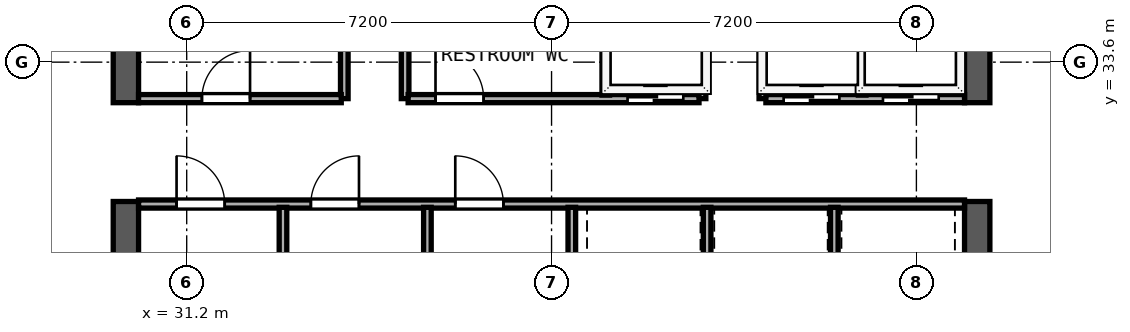
"""IFC4 building model, lengths in metres.
Left out: names, types, materials, properties, quantities, classifications, styles, units other than length and angle.
Written with IfcOpenShell. Run it as: python <this file> out.ifc"""

import sys

from ifc_helpers import new_model, si_unit, direction, frame, frame_2d, origin, place, context, subcontext, project, spatial, rectangle, extrude, element, fill, save


model = new_model("IFC4")
c1 = context("Model", 3, precision=1e-05, world=origin(), true_north=direction((0.0, 1.0)))
c2 = subcontext(c1, "Body", "Model", "MODEL_VIEW")
j1 = project(units=[si_unit("LENGTHUNIT", "METRE"), si_unit("PLANEANGLEUNIT", "RADIAN")], contexts=[c1])
p1 = place(None, origin())
s1 = spatial("IfcSite", under=j1, at=p1, CompositionType="ELEMENT")
p2 = place(p1, origin())
s2 = spatial("IfcBuilding", under=s1, at=p2, CompositionType="ELEMENT")
p3 = place(p2, frame((0.0, 0.0, 254.45)))
s3 = spatial("IfcBuildingStorey", under=s2, at=p3, CompositionType="ELEMENT", Elevation=254.45)
p4 = place(p3, frame((30.0, 26.65, 0.0), z_axis=(0.0, 0.0, 1.0), x_axis=(0.0, 1.0, 0.0)))
e1 = element("IfcWall", 1, at=p4, inside=s3, PredefinedType="SHEAR", context=c2, shape_type="SweptSolid", body=[
    extrude(rectangle(XDim=4.2, YDim=0.5, at=frame_2d((2.1, 0.0))), origin(), (0.0, 0.0, 1.0), 3.67),
])
p5 = place(p3, frame((30.0, 32.8, 0.0), z_axis=(0.0, 0.0, 1.0), x_axis=(0.0, 1.0, 0.0)))
e2 = element("IfcWall", 2, at=p5, inside=s3, PredefinedType="SHEAR", context=c2, shape_type="SweptSolid", body=[
    extrude(rectangle(XDim=10.15, YDim=0.5, at=frame_2d((5.075, 0.0))), origin(), (0.0, 0.0, 1.0), 3.67),
])
p6 = place(p3, frame((46.8, 26.65, 0.0), z_axis=(0.0, 0.0, 1.0), x_axis=(0.0, 1.0, 0.0)))
e3 = element("IfcWall", 3, at=p6, inside=s3, PredefinedType="SHEAR", context=c2, shape_type="SweptSolid", body=[
    extrude(rectangle(XDim=4.2, YDim=0.5, at=frame_2d((2.1, 0.0))), origin(), (0.0, 0.0, 1.0), 3.67),
])
p7 = place(p3, frame((46.8, 32.8, 0.0), z_axis=(0.0, 0.0, 1.0), x_axis=(0.0, 1.0, 0.0)))
e4 = element("IfcWall", 4, at=p7, inside=s3, PredefinedType="SHEAR", context=c2, shape_type="SweptSolid", body=[
    extrude(rectangle(XDim=10.15, YDim=0.5, at=frame_2d((5.075, 0.0))), origin(), (0.0, 0.0, 1.0), 3.67),
])
for number, where, z_axis, x_axis in (
    (5, (34.31, 32.88, 0.0), (0.0, 0.0, 1.0), (0.0, 1.0, 0.0)),
    (6, (35.51, 32.88, 0.0), (0.0, 0.0, 1.0), (0.0, 1.0, 0.0)),
    (7, (41.37, 32.88, 0.0), (0.0, 0.0, 1.0), (0.0, 1.0, 0.0)),
    (8, (42.57, 32.88, 0.0), (0.0, 0.0, 1.0), (0.0, 1.0, 0.0)),
):
    element("IfcWall", number, at=place(p3, frame(where, z_axis=z_axis, x_axis=x_axis)), inside=s3, PredefinedType="SOLIDWALL", context=c2, shape_type="SweptSolid", body=[
        extrude(rectangle(XDim=2.17, YDim=0.15, at=frame_2d((1.085, 0.0))), origin(), (0.0, 0.0, 1.0), 3.67),
    ])
p8 = place(p3, frame((30.25, 32.88, 0.0), z_axis=(0.0, 0.0, 1.0), x_axis=(1.0, 0.0, 0.0)))
e9 = element("IfcWall", 9, at=p8, inside=s3, PredefinedType="SOLIDWALL", context=c2, shape_type="SweptSolid", body=[
    extrude(rectangle(XDim=4.0, YDim=0.16, at=frame_2d((2.0, 0.0))), origin(), (0.0, 0.0, 1.0), 3.67),
])
p9 = place(p8, frame((2.2, 0.0, 0.0), z_axis=(0.0, 0.0, 1.0), x_axis=(-1.0, 0.0, 0.0)))
e10 = element("IfcOpeningElement", 10, at=p9, cuts=e9, PredefinedType="OPENING", context=c2, shape_type="SweptSolid", body=[
    extrude(rectangle(XDim=0.95, YDim=2.12, at=frame_2d((0.475, 1.06))), frame((0.0, 0.09, 0.0), z_axis=(0.0, -1.0, 0.0), x_axis=(1.0, 0.0, 0.0)), (0.0, 0.0, 1.0), 0.18),
])
p10 = place(p3, frame((35.57, 32.88, 0.0), z_axis=(0.0, 0.0, 1.0), x_axis=(1.0, 0.0, 0.0)))
e11 = element("IfcWall", 11, at=p10, inside=s3, PredefinedType="SOLIDWALL", context=c2, shape_type="SweptSolid", body=[
    extrude(rectangle(XDim=5.74, YDim=0.16, at=frame_2d((2.87, 0.0))), origin(), (0.0, 0.0, 1.0), 3.67),
])
p11 = place(p10, frame((1.49, 0.0, 0.0), z_axis=(0.0, 0.0, 1.0), x_axis=(-1.0, 0.0, 0.0)))
e12 = element("IfcOpeningElement", 12, at=p11, cuts=e11, PredefinedType="OPENING", context=c2, shape_type="SweptSolid", body=[
    extrude(rectangle(XDim=0.95, YDim=2.12, at=frame_2d((0.475, 1.06))), frame((0.0, 0.09, 0.0), z_axis=(0.0, -1.0, 0.0), x_axis=(1.0, 0.0, 0.0)), (0.0, 0.0, 1.0), 0.18),
])
p12 = place(p10, frame((5.43, 0.0, 0.0), z_axis=(0.0, 0.0, 1.0), x_axis=(-1.0, 0.0, 0.0)))
e13 = element("IfcOpeningElement", 13, at=p12, cuts=e11, PredefinedType="OPENING", context=c2, shape_type="SweptSolid", body=[
    extrude(rectangle(XDim=1.1, YDim=2.2, at=frame_2d((0.55, 1.1))), frame((0.0, 0.09, 0.0), z_axis=(0.0, -1.0, 0.0), x_axis=(1.0, 0.0, 0.0)), (0.0, 0.0, 1.0), 0.18),
])
p13 = place(p3, frame((42.63, 32.88, 0.0), z_axis=(0.0, 0.0, 1.0), x_axis=(1.0, 0.0, 0.0)))
e14 = element("IfcWall", 14, at=p13, inside=s3, PredefinedType="SOLIDWALL", context=c2, shape_type="SweptSolid", body=[
    extrude(rectangle(XDim=3.92, YDim=0.16, at=frame_2d((1.96, 0.0))), origin(), (0.0, 0.0, 1.0), 3.67),
])
p14 = place(p13, frame((1.45, 0.0, 0.0), z_axis=(0.0, 0.0, 1.0), x_axis=(-1.0, 0.0, 0.0)))
e15 = element("IfcOpeningElement", 15, at=p14, cuts=e14, PredefinedType="OPENING", context=c2, shape_type="SweptSolid", body=[
    extrude(rectangle(XDim=1.1, YDim=2.2, at=frame_2d((0.55, 1.1))), frame((0.0, 0.09, 0.0), z_axis=(0.0, -1.0, 0.0), x_axis=(1.0, 0.0, 0.0)), (0.0, 0.0, 1.0), 0.18),
])
p15 = place(p13, frame((3.41, 0.0, 0.0), z_axis=(0.0, 0.0, 1.0), x_axis=(-1.0, 0.0, 0.0)))
e16 = element("IfcOpeningElement", 16, at=p15, cuts=e14, PredefinedType="OPENING", context=c2, shape_type="SweptSolid", body=[
    extrude(rectangle(XDim=1.1, YDim=2.2, at=frame_2d((0.55, 1.1))), frame((0.0, 0.09, 0.0), z_axis=(0.0, -1.0, 0.0), x_axis=(1.0, 0.0, 0.0)), (0.0, 0.0, 1.0), 0.18),
])
for number, where, z_axis, x_axis in (
    (17, (39.47, 32.95, 0.0), (0.0, 0.0, 1.0), (0.0, 1.0, 0.0)),
    (18, (44.53, 32.95, 0.0), (0.0, 0.0, 1.0), (0.0, 1.0, 0.0)),
):
    element("IfcWall", number, at=place(p3, frame(where, z_axis=z_axis, x_axis=x_axis)), inside=s3, PredefinedType="SOLIDWALL", context=c2, shape_type="SweptSolid", body=[
        extrude(rectangle(XDim=2.05, YDim=0.15, at=frame_2d((1.025, 0.0))), origin(), (0.0, 0.0, 1.0), 3.67),
    ])
p16 = place(p3, frame((30.25, 30.8, 0.0), z_axis=(0.0, 0.0, 1.0), x_axis=(1.0, 0.0, 0.0)))
e19 = element("IfcWall", 19, at=p16, inside=s3, PredefinedType="SOLIDWALL", context=c2, shape_type="SweptSolid", body=[
    extrude(rectangle(XDim=16.3, YDim=0.16, at=frame_2d((8.15, 0.0))), origin(), (0.0, 0.0, 1.0), 3.67),
])
p17 = place(p16, frame((0.75, 0.0, 0.0)))
e20 = element("IfcOpeningElement", 20, at=p17, cuts=e19, PredefinedType="OPENING", context=c2, shape_type="SweptSolid", body=[
    extrude(rectangle(XDim=0.95, YDim=2.12, at=frame_2d((0.475, 1.06))), frame((0.0, 0.09, 0.0), z_axis=(0.0, -1.0, 0.0), x_axis=(1.0, 0.0, 0.0)), (0.0, 0.0, 1.0), 0.18),
])
p18 = place(p16, frame((3.4, 0.0, 0.0)))
e21 = element("IfcOpeningElement", 21, at=p18, cuts=e19, PredefinedType="OPENING", context=c2, shape_type="SweptSolid", body=[
    extrude(rectangle(XDim=0.95, YDim=2.12, at=frame_2d((0.475, 1.06))), frame((0.0, 0.09, 0.0), z_axis=(0.0, -1.0, 0.0), x_axis=(1.0, 0.0, 0.0)), (0.0, 0.0, 1.0), 0.18),
])
p19 = place(p16, frame((6.25, 0.0, 0.0)))
e22 = element("IfcOpeningElement", 22, at=p19, cuts=e19, PredefinedType="OPENING", context=c2, shape_type="SweptSolid", body=[
    extrude(rectangle(XDim=0.95, YDim=2.12, at=frame_2d((0.475, 1.06))), frame((0.0, 0.09, 0.0), z_axis=(0.0, -1.0, 0.0), x_axis=(1.0, 0.0, 0.0)), (0.0, 0.0, 1.0), 0.18),
])
p20 = place(p3, frame((38.8, 26.66, 0.0), z_axis=(0.0, 0.0, 1.0), x_axis=(0.0, 1.0, 0.0)))
e23 = element("IfcWall", 23, at=p20, inside=s3, PredefinedType="SOLIDWALL", context=c2, shape_type="SweptSolid", body=[
    extrude(rectangle(XDim=4.075, YDim=0.15, at=frame_2d((2.038, 0.0))), origin(), (0.0, 0.0, 1.0), 3.67),
])
for number, where, z_axis, x_axis in (
    (24, (33.1, 26.66, 0.0), (0.0, 0.0, 1.0), (0.0, 1.0, 0.0)),
    (25, (35.95, 26.66, 0.0), (0.0, 0.0, 1.0), (0.0, 1.0, 0.0)),
):
    element("IfcWall", number, at=place(p3, frame(where, z_axis=z_axis, x_axis=x_axis)), inside=s3, PredefinedType="PARTITIONING", context=c2, shape_type="SweptSolid", body=[
        extrude(rectangle(XDim=4.075, YDim=0.15, at=frame_2d((2.038, 0.0))), origin(), (0.0, 0.0, 1.0), 3.67),
    ])
for number, where, z_axis, x_axis in (
    (26, (41.47, 28.75, 0.0), (0.0, 0.0, 1.0), (0.0, 1.0, 0.0)),
    (27, (43.98, 28.75, 0.0), (0.0, 0.0, 1.0), (0.0, 1.0, 0.0)),
):
    element("IfcWall", number, at=place(p3, frame(where, z_axis=z_axis, x_axis=x_axis)), inside=s3, PredefinedType="SOLIDWALL", context=c2, shape_type="SweptSolid", body=[
        extrude(rectangle(XDim=1.985, YDim=0.15, at=frame_2d((0.993, 0.0))), origin(), (0.0, 0.0, 1.0), 3.67),
    ])
p21 = place(p9, origin())
e28 = element("IfcDoor", 28, at=p21, inside=s3, OperationType="SINGLE_SWING_LEFT", PredefinedType="DOOR", context=c2, shape_type="SweptSolid", body=[
    extrude(rectangle(XDim=0.95, YDim=2.12, at=frame_2d((0.475, 1.06))), frame((0.0, 0.025, 0.0), z_axis=(0.0, -1.0, 0.0), x_axis=(1.0, 0.0, 0.0)), (0.0, 0.0, 1.0), 0.05),
])
fill(e10, e28)
p22 = place(p11, origin())
e29 = element("IfcDoor", 29, at=p22, inside=s3, OperationType="SINGLE_SWING_RIGHT", PredefinedType="DOOR", context=c2, shape_type="SweptSolid", body=[
    extrude(rectangle(XDim=0.95, YDim=2.12, at=frame_2d((0.475, 1.06))), frame((0.0, 0.025, 0.0), z_axis=(0.0, -1.0, 0.0), x_axis=(1.0, 0.0, 0.0)), (0.0, 0.0, 1.0), 0.05),
])
fill(e12, e29)
p23 = place(p12, origin())
e30 = element("IfcDoor", 30, at=p23, inside=s3, OperationType="SLIDING_TO_RIGHT", PredefinedType="DOOR", context=c2, shape_type="SweptSolid", body=[
    extrude(rectangle(XDim=1.1, YDim=2.2, at=frame_2d((0.55, 1.1))), frame((0.0, 0.025, 0.0), z_axis=(0.0, -1.0, 0.0), x_axis=(1.0, 0.0, 0.0)), (0.0, 0.0, 1.0), 0.05),
])
fill(e13, e30)
p24 = place(p14, origin())
e31 = element("IfcDoor", 31, at=p24, inside=s3, OperationType="SLIDING_TO_RIGHT", PredefinedType="DOOR", context=c2, shape_type="SweptSolid", body=[
    extrude(rectangle(XDim=1.1, YDim=2.2, at=frame_2d((0.55, 1.1))), frame((0.0, 0.025, 0.0), z_axis=(0.0, -1.0, 0.0), x_axis=(1.0, 0.0, 0.0)), (0.0, 0.0, 1.0), 0.05),
])
fill(e15, e31)
p25 = place(p15, origin())
e32 = element("IfcDoor", 32, at=p25, inside=s3, OperationType="SLIDING_TO_RIGHT", PredefinedType="DOOR", context=c2, shape_type="SweptSolid", body=[
    extrude(rectangle(XDim=1.1, YDim=2.2, at=frame_2d((0.55, 1.1))), frame((0.0, 0.025, 0.0), z_axis=(0.0, -1.0, 0.0), x_axis=(1.0, 0.0, 0.0)), (0.0, 0.0, 1.0), 0.05),
])
fill(e16, e32)
p26 = place(p17, origin())
e33 = element("IfcDoor", 33, at=p26, inside=s3, OperationType="SINGLE_SWING_LEFT", PredefinedType="DOOR", context=c2, shape_type="SweptSolid", body=[
    extrude(rectangle(XDim=0.95, YDim=2.12, at=frame_2d((0.475, 1.06))), frame((0.0, 0.025, 0.0), z_axis=(0.0, -1.0, 0.0), x_axis=(1.0, 0.0, 0.0)), (0.0, 0.0, 1.0), 0.05),
])
fill(e20, e33)
p27 = place(p18, origin())
e34 = element("IfcDoor", 34, at=p27, inside=s3, OperationType="SINGLE_SWING_RIGHT", PredefinedType="DOOR", context=c2, shape_type="SweptSolid", body=[
    extrude(rectangle(XDim=0.95, YDim=2.12, at=frame_2d((0.475, 1.06))), frame((0.0, 0.025, 0.0), z_axis=(0.0, -1.0, 0.0), x_axis=(1.0, 0.0, 0.0)), (0.0, 0.0, 1.0), 0.05),
])
fill(e21, e34)
p28 = place(p19, origin())
e35 = element("IfcDoor", 35, at=p28, inside=s3, OperationType="SINGLE_SWING_LEFT", PredefinedType="DOOR", context=c2, shape_type="SweptSolid", body=[
    extrude(rectangle(XDim=0.95, YDim=2.12, at=frame_2d((0.475, 1.06))), frame((0.0, 0.025, 0.0), z_axis=(0.0, -1.0, 0.0), x_axis=(1.0, 0.0, 0.0)), (0.0, 0.0, 1.0), 0.05),
])
fill(e22, e35)
save(model, sys.argv[1])
